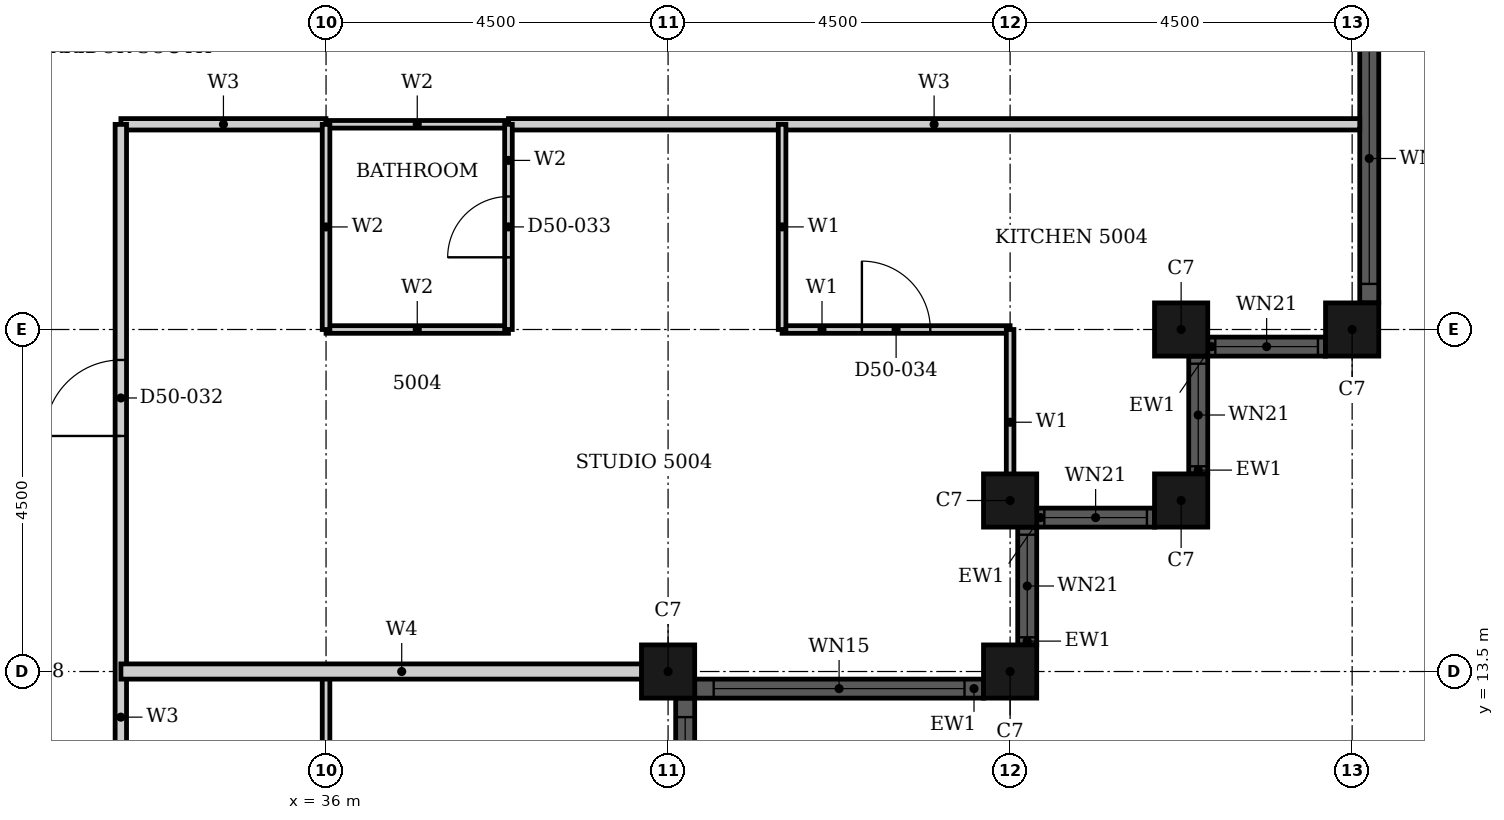
"""IFC4 building model, lengths in metres.
Left out: names, types, materials, properties, quantities, classifications, styles, units other than length and angle.
Written with IfcOpenShell. Run it as: python <this file> out.ifc"""

import sys

from ifc_helpers import new_model, si_unit, direction, frame, frame_2d, origin, origin_2d, place, context, subcontext, project, spatial, rectangle, hollow_rectangle, extrude, element, fill, save


model = new_model("IFC4")
c1 = context("Model", 3, precision=1e-05, world=origin(), true_north=direction((0.0, 1.0)))
c2 = subcontext(c1, "Body", "Model", "MODEL_VIEW")
j1 = project(units=[si_unit("LENGTHUNIT", "METRE"), si_unit("PLANEANGLEUNIT", "RADIAN")], contexts=[c1])
p1 = place(None, origin())
s1 = spatial("IfcSite", under=j1, at=p1, CompositionType="ELEMENT")
p2 = place(p1, origin())
s2 = spatial("IfcBuilding", under=s1, at=p2, CompositionType="ELEMENT")
p3 = place(p2, frame((0.0, 0.0, 199.8)))
s3 = spatial("IfcBuildingStorey", under=s2, at=p3, CompositionType="ELEMENT", Elevation=199.8)
for number, where, z_axis, x_axis in (
    (1, (40.5, 13.5, 0.0), (0.0, 0.0, 1.0), (1.0, 0.0, 0.0)),
    (2, (45.0, 13.5, 0.0), (0.0, 0.0, 1.0), (1.0, 0.0, 0.0)),
    (3, (45.0, 15.75, 0.0), (0.0, 0.0, 1.0), (1.0, 0.0, 0.0)),
    (4, (47.25, 15.75, 0.0), (0.0, 0.0, 1.0), (1.0, 0.0, 0.0)),
    (5, (47.25, 18.0, 0.0), (0.0, 0.0, 1.0), (1.0, 0.0, 0.0)),
    (6, (49.5, 18.0, 0.0), (0.0, 0.0, 1.0), (1.0, 0.0, 0.0)),
):
    element("IfcColumn", number, at=place(p3, frame(where, z_axis=z_axis, x_axis=x_axis)), inside=s3, PredefinedType="COLUMN", context=c2, shape_type="SweptSolid", body=[
        extrude(hollow_rectangle(XDim=0.7, YDim=0.7, WallThickness=0.022, at=origin_2d()), origin(), (0.0, 0.0, 1.0), 3.7),
    ])
p4 = place(p3, frame((40.85, 13.275, 0.0), z_axis=(0.0, 0.0, 1.0), x_axis=(1.0, 0.0, 0.0)))
e7 = element("IfcWall", 7, at=p4, inside=s3, PredefinedType="SOLIDWALL", context=c2, shape_type="SweptSolid", body=[
    extrude(rectangle(XDim=3.8, YDim=0.25, at=frame_2d((1.9, 0.0))), origin(), (0.0, 0.0, 1.0), 3.7),
])
p5 = place(p4, frame((0.25, 0.0, 0.45)))
e8 = element("IfcOpeningElement", 8, at=p5, cuts=e7, PredefinedType="OPENING", context=c2, shape_type="SweptSolid", body=[
    extrude(rectangle(XDim=3.3, YDim=2.3, at=frame_2d((1.65, 1.15))), frame((0.0, 0.135, 0.0), z_axis=(0.0, -1.0, 0.0), x_axis=(1.0, 0.0, 0.0)), (0.0, 0.0, 1.0), 0.27),
])
p6 = place(p3, frame((45.225, 13.85, 0.0), z_axis=(0.0, 0.0, 1.0), x_axis=(0.0, 1.0, 0.0)))
e9 = element("IfcWall", 9, at=p6, inside=s3, PredefinedType="SOLIDWALL", context=c2, shape_type="SweptSolid", body=[
    extrude(rectangle(XDim=1.55, YDim=0.25, at=frame_2d((0.775, 0.0))), origin(), (0.0, 0.0, 1.0), 3.7),
])
p7 = place(p6, frame((0.1, 0.0, 0.9)))
e10 = element("IfcOpeningElement", 10, at=p7, cuts=e9, PredefinedType="OPENING", context=c2, shape_type="SweptSolid", body=[
    extrude(rectangle(XDim=1.35, YDim=1.85, at=frame_2d((0.675, 0.925))), frame((0.0, 0.135, 0.0), z_axis=(0.0, -1.0, 0.0), x_axis=(1.0, 0.0, 0.0)), (0.0, 0.0, 1.0), 0.27),
])
p8 = place(p3, frame((45.35, 15.525, 0.0), z_axis=(0.0, 0.0, 1.0), x_axis=(1.0, 0.0, 0.0)))
e11 = element("IfcWall", 11, at=p8, inside=s3, PredefinedType="SOLIDWALL", context=c2, shape_type="SweptSolid", body=[
    extrude(rectangle(XDim=1.55, YDim=0.25, at=frame_2d((0.775, 0.0))), origin(), (0.0, 0.0, 1.0), 3.7),
])
p9 = place(p8, frame((0.1, 0.0, 0.9)))
e12 = element("IfcOpeningElement", 12, at=p9, cuts=e11, PredefinedType="OPENING", context=c2, shape_type="SweptSolid", body=[
    extrude(rectangle(XDim=1.35, YDim=1.85, at=frame_2d((0.675, 0.925))), frame((0.0, 0.135, 0.0), z_axis=(0.0, -1.0, 0.0), x_axis=(1.0, 0.0, 0.0)), (0.0, 0.0, 1.0), 0.27),
])
p10 = place(p3, frame((47.475, 16.1, 0.0), z_axis=(0.0, 0.0, 1.0), x_axis=(0.0, 1.0, 0.0)))
e13 = element("IfcWall", 13, at=p10, inside=s3, PredefinedType="SOLIDWALL", context=c2, shape_type="SweptSolid", body=[
    extrude(rectangle(XDim=1.55, YDim=0.25, at=frame_2d((0.775, 0.0))), origin(), (0.0, 0.0, 1.0), 3.7),
])
p11 = place(p10, frame((0.1, 0.0, 0.9)))
e14 = element("IfcOpeningElement", 14, at=p11, cuts=e13, PredefinedType="OPENING", context=c2, shape_type="SweptSolid", body=[
    extrude(rectangle(XDim=1.35, YDim=1.85, at=frame_2d((0.675, 0.925))), frame((0.0, 0.135, 0.0), z_axis=(0.0, -1.0, 0.0), x_axis=(1.0, 0.0, 0.0)), (0.0, 0.0, 1.0), 0.27),
])
p12 = place(p3, frame((47.6, 17.775, 0.0), z_axis=(0.0, 0.0, 1.0), x_axis=(1.0, 0.0, 0.0)))
e15 = element("IfcWall", 15, at=p12, inside=s3, PredefinedType="SOLIDWALL", context=c2, shape_type="SweptSolid", body=[
    extrude(rectangle(XDim=1.55, YDim=0.25, at=frame_2d((0.775, 0.0))), origin(), (0.0, 0.0, 1.0), 3.7),
])
p13 = place(p12, frame((0.1, 0.0, 0.9)))
e16 = element("IfcOpeningElement", 16, at=p13, cuts=e15, PredefinedType="OPENING", context=c2, shape_type="SweptSolid", body=[
    extrude(rectangle(XDim=1.35, YDim=1.85, at=frame_2d((0.675, 0.925))), frame((0.0, 0.135, 0.0), z_axis=(0.0, -1.0, 0.0), x_axis=(1.0, 0.0, 0.0)), (0.0, 0.0, 1.0), 0.27),
])
p14 = place(p3, frame((49.725, 18.35, 0.0), z_axis=(0.0, 0.0, 1.0), x_axis=(0.0, 1.0, 0.0)))
e17 = element("IfcWall", 17, at=p14, inside=s3, PredefinedType="SOLIDWALL", context=c2, shape_type="SweptSolid", body=[
    extrude(rectangle(XDim=8.3, YDim=0.25, at=frame_2d((4.15, 0.0))), origin(), (0.0, 0.0, 1.0), 3.7),
])
p15 = place(p14, frame((0.25, 0.0, 0.45)))
e18 = element("IfcOpeningElement", 18, at=p15, cuts=e17, PredefinedType="OPENING", context=c2, shape_type="SweptSolid", body=[
    extrude(rectangle(XDim=3.3, YDim=2.3, at=frame_2d((1.65, 1.15))), frame((0.0, 0.135, 0.0), z_axis=(0.0, -1.0, 0.0), x_axis=(1.0, 0.0, 0.0)), (0.0, 0.0, 1.0), 0.27),
])
p16 = place(p14, frame((4.75, 0.0, 0.45)))
e19 = element("IfcOpeningElement", 19, at=p16, cuts=e17, PredefinedType="OPENING", context=c2, shape_type="SweptSolid", body=[
    extrude(rectangle(XDim=3.3, YDim=2.3, at=frame_2d((1.65, 1.15))), frame((0.0, 0.135, 0.0), z_axis=(0.0, -1.0, 0.0), x_axis=(1.0, 0.0, 0.0)), (0.0, 0.0, 1.0), 0.27),
])
p17 = place(p3, frame((40.725, 4.85, 0.0), z_axis=(0.0, 0.0, 1.0), x_axis=(0.0, 1.0, 0.0)))
e20 = element("IfcWall", 20, at=p17, inside=s3, PredefinedType="SOLIDWALL", context=c2, shape_type="SweptSolid", body=[
    extrude(rectangle(XDim=8.3, YDim=0.25, at=frame_2d((4.15, 0.0))), origin(), (0.0, 0.0, 1.0), 3.7),
])
p18 = place(p17, frame((0.25, 0.0, 0.45)))
e21 = element("IfcOpeningElement", 21, at=p18, cuts=e20, PredefinedType="OPENING", context=c2, shape_type="SweptSolid", body=[
    extrude(rectangle(XDim=3.3, YDim=2.3, at=frame_2d((1.65, 1.15))), frame((0.0, 0.135, 0.0), z_axis=(0.0, -1.0, 0.0), x_axis=(1.0, 0.0, 0.0)), (0.0, 0.0, 1.0), 0.27),
])
p19 = place(p17, frame((4.75, 0.0, 0.45)))
e22 = element("IfcOpeningElement", 22, at=p19, cuts=e20, PredefinedType="OPENING", context=c2, shape_type="SweptSolid", body=[
    extrude(rectangle(XDim=3.3, YDim=2.3, at=frame_2d((1.65, 1.15))), frame((0.0, 0.135, 0.0), z_axis=(0.0, -1.0, 0.0), x_axis=(1.0, 0.0, 0.0)), (0.0, 0.0, 1.0), 0.27),
])
p20 = place(p3, frame((33.301, 20.7, 0.0), z_axis=(0.0, 0.0, 1.0), x_axis=(1.0, 0.0, 0.0)))
e23 = element("IfcWall", 23, at=p20, inside=s3, PredefinedType="PARTITIONING", context=c2, shape_type="SweptSolid", body=[
    extrude(rectangle(XDim=2.698, YDim=0.15, at=frame_2d((1.349, 0.0))), origin(), (0.0, 0.0, 1.0), 3.4),
])
p21 = place(p3, frame((38.4, 20.7, 0.0), z_axis=(0.0, 0.0, 1.0), x_axis=(1.0, 0.0, 0.0)))
e24 = element("IfcWall", 24, at=p21, inside=s3, PredefinedType="PARTITIONING", context=c2, shape_type="SweptSolid", body=[
    extrude(rectangle(XDim=11.2, YDim=0.15, at=frame_2d((5.6, 0.0))), origin(), (0.0, 0.0, 1.0), 3.4),
])
p22 = place(p3, frame((33.3, 6.9, 0.0), z_axis=(0.0, 0.0, 1.0), x_axis=(0.0, 1.0, 0.0)))
e25 = element("IfcWall", 25, at=p22, inside=s3, PredefinedType="PARTITIONING", context=c2, shape_type="SweptSolid", body=[
    extrude(rectangle(XDim=13.799, YDim=0.15, at=frame_2d((6.899, 0.0))), origin(), (0.0, 0.0, 1.0), 3.4),
])
p23 = place(p22, frame((9.699, 0.0, 0.0)))
e26 = element("IfcOpeningElement", 26, at=p23, cuts=e25, PredefinedType="OPENING", context=c2, shape_type="SweptSolid", body=[
    extrude(rectangle(XDim=1.0, YDim=2.2, at=frame_2d((0.5, 1.1))), frame((0.0, 0.085, 0.0), z_axis=(0.0, -1.0, 0.0), x_axis=(1.0, 0.0, 0.0)), (0.0, 0.0, 1.0), 0.17),
])
p24 = place(p22, frame((1.3, 0.0, 0.0)))
e27 = element("IfcOpeningElement", 27, at=p24, cuts=e25, PredefinedType="OPENING", context=c2, shape_type="SweptSolid", body=[
    extrude(rectangle(XDim=1.0, YDim=2.2, at=frame_2d((0.5, 1.1))), frame((0.0, 0.085, 0.0), z_axis=(0.0, -1.0, 0.0), x_axis=(1.0, 0.0, 0.0)), (0.0, 0.0, 1.0), 0.17),
])
p25 = place(p3, frame((42.0, 18.0, 0.0), z_axis=(0.0, 0.0, 1.0), x_axis=(1.0, 0.0, 0.0)))
e28 = element("IfcWall", 28, at=p25, inside=s3, PredefinedType="PARTITIONING", context=c2, shape_type="SweptSolid", body=[
    extrude(rectangle(XDim=3.0, YDim=0.1, at=frame_2d((1.5, 0.0))), origin(), (0.0, 0.0, 1.0), 3.4),
])
p26 = place(p25, frame((1.05, 0.0, 0.0)))
e29 = element("IfcOpeningElement", 29, at=p26, cuts=e28, PredefinedType="OPENING", context=c2, shape_type="SweptSolid", body=[
    extrude(rectangle(XDim=0.9, YDim=2.1, at=frame_2d((0.45, 1.05))), frame((0.0, 0.06, 0.0), z_axis=(0.0, -1.0, 0.0), x_axis=(1.0, 0.0, 0.0)), (0.0, 0.0, 1.0), 0.12),
])
p27 = place(p3, frame((36.0, 10.5, 0.0), z_axis=(0.0, 0.0, 1.0), x_axis=(0.0, 1.0, 0.0)))
e30 = element("IfcWall", 30, at=p27, inside=s3, PredefinedType="PARTITIONING", context=c2, shape_type="SweptSolid", body=[
    extrude(rectangle(XDim=3.0, YDim=0.1, at=frame_2d((1.5, 0.0))), origin(), (0.0, 0.0, 1.0), 2.68),
])
p28 = place(p27, frame((1.05, 0.0, 0.0)))
e31 = element("IfcOpeningElement", 31, at=p28, cuts=e30, PredefinedType="OPENING", context=c2, shape_type="SweptSolid", body=[
    extrude(rectangle(XDim=0.9, YDim=2.1, at=frame_2d((0.45, 1.05))), frame((0.0, 0.06, 0.0), z_axis=(0.0, -1.0, 0.0), x_axis=(1.0, 0.0, 0.0)), (0.0, 0.0, 1.0), 0.12),
])
p29 = place(p3, frame((42.0, 18.0, 0.0), z_axis=(0.0, 0.0, 1.0), x_axis=(0.0, 1.0, 0.0)))
e32 = element("IfcWall", 32, at=p29, inside=s3, PredefinedType="PARTITIONING", context=c2, shape_type="SweptSolid", body=[
    extrude(rectangle(XDim=2.7, YDim=0.1, at=frame_2d((1.35, 0.0))), origin(), (0.0, 0.0, 1.0), 3.4),
])
p30 = place(p3, frame((45.0, 15.56, 0.0), z_axis=(0.0, 0.0, 1.0), x_axis=(0.0, 1.0, 0.0)))
e33 = element("IfcWall", 33, at=p30, inside=s3, PredefinedType="PARTITIONING", context=c2, shape_type="SweptSolid", body=[
    extrude(rectangle(XDim=2.44, YDim=0.1, at=frame_2d((1.22, 0.0))), origin(), (0.0, 0.0, 1.0), 3.4),
])
p31 = place(p3, frame((33.301, 13.5, 0.0), z_axis=(0.0, 0.0, 1.0), x_axis=(1.0, 0.0, 0.0)))
e34 = element("IfcWall", 34, at=p31, inside=s3, PredefinedType="PARTITIONING", context=c2, shape_type="SweptSolid", body=[
    extrude(rectangle(XDim=7.389, YDim=0.2, at=frame_2d((3.694, 0.0))), origin(), (0.0, 0.0, 1.0), 2.48),
])
for number, where, z_axis, x_axis in (
    (35, (36.0, 18.0, 0.0), (0.0, 0.0, 1.0), (1.0, 0.0, 0.0)),
    (36, (36.0, 20.7, 0.0), (0.0, 0.0, 1.0), (1.0, 0.0, 0.0)),
):
    element("IfcWall", number, at=place(p3, frame(where, z_axis=z_axis, x_axis=x_axis)), inside=s3, PredefinedType="PARTITIONING", context=c2, shape_type="SweptSolid", body=[
        extrude(rectangle(XDim=2.4, YDim=0.1, at=frame_2d((1.2, 0.0))), origin(), (0.0, 0.0, 1.0), 3.4),
    ])
p32 = place(p3, frame((36.0, 18.0, 0.0), z_axis=(0.0, 0.0, 1.0), x_axis=(0.0, 1.0, 0.0)))
e37 = element("IfcWall", 37, at=p32, inside=s3, PredefinedType="PARTITIONING", context=c2, shape_type="SweptSolid", body=[
    extrude(rectangle(XDim=2.699, YDim=0.1, at=frame_2d((1.35, 0.0))), origin(), (0.0, 0.0, 1.0), 3.4),
])
p33 = place(p3, frame((38.4, 18.0, 0.0), z_axis=(0.0, 0.0, 1.0), x_axis=(0.0, 1.0, 0.0)))
e38 = element("IfcWall", 38, at=p33, inside=s3, PredefinedType="PARTITIONING", context=c2, shape_type="SweptSolid", body=[
    extrude(rectangle(XDim=2.7, YDim=0.1, at=frame_2d((1.35, 0.0))), origin(), (0.0, 0.0, 1.0), 3.4),
])
p34 = place(p33, frame((0.95, 0.0, 0.0)))
e39 = element("IfcOpeningElement", 39, at=p34, cuts=e38, PredefinedType="OPENING", context=c2, shape_type="SweptSolid", body=[
    extrude(rectangle(XDim=0.8, YDim=2.1, at=frame_2d((0.4, 1.05))), frame((0.0, 0.06, 0.0), z_axis=(0.0, -1.0, 0.0), x_axis=(1.0, 0.0, 0.0)), (0.0, 0.0, 1.0), 0.12),
])
p35 = place(p5, origin())
e40 = element("IfcWindow", 40, at=p35, inside=s3, PartitioningType="SINGLE_PANEL", PredefinedType="WINDOW", context=c2, shape_type="SweptSolid", body=[
    extrude(rectangle(XDim=3.3, YDim=2.3, at=frame_2d((1.65, 1.15))), frame((0.0, 0.03, 0.0), z_axis=(0.0, -1.0, 0.0), x_axis=(1.0, 0.0, 0.0)), (0.0, 0.0, 1.0), 0.06),
])
fill(e8, e40)
p36 = place(p7, origin())
e41 = element("IfcWindow", 41, at=p36, inside=s3, PartitioningType="SINGLE_PANEL", PredefinedType="WINDOW", context=c2, shape_type="SweptSolid", body=[
    extrude(rectangle(XDim=1.35, YDim=1.85, at=frame_2d((0.675, 0.925))), frame((0.0, 0.03, 0.0), z_axis=(0.0, -1.0, 0.0), x_axis=(1.0, 0.0, 0.0)), (0.0, 0.0, 1.0), 0.06),
])
fill(e10, e41)
p37 = place(p9, origin())
e42 = element("IfcWindow", 42, at=p37, inside=s3, PartitioningType="SINGLE_PANEL", PredefinedType="WINDOW", context=c2, shape_type="SweptSolid", body=[
    extrude(rectangle(XDim=1.35, YDim=1.85, at=frame_2d((0.675, 0.925))), frame((0.0, 0.03, 0.0), z_axis=(0.0, -1.0, 0.0), x_axis=(1.0, 0.0, 0.0)), (0.0, 0.0, 1.0), 0.06),
])
fill(e12, e42)
p38 = place(p11, origin())
e43 = element("IfcWindow", 43, at=p38, inside=s3, PartitioningType="SINGLE_PANEL", PredefinedType="WINDOW", context=c2, shape_type="SweptSolid", body=[
    extrude(rectangle(XDim=1.35, YDim=1.85, at=frame_2d((0.675, 0.925))), frame((0.0, 0.03, 0.0), z_axis=(0.0, -1.0, 0.0), x_axis=(1.0, 0.0, 0.0)), (0.0, 0.0, 1.0), 0.06),
])
fill(e14, e43)
p39 = place(p13, origin())
e44 = element("IfcWindow", 44, at=p39, inside=s3, PartitioningType="SINGLE_PANEL", PredefinedType="WINDOW", context=c2, shape_type="SweptSolid", body=[
    extrude(rectangle(XDim=1.35, YDim=1.85, at=frame_2d((0.675, 0.925))), frame((0.0, 0.03, 0.0), z_axis=(0.0, -1.0, 0.0), x_axis=(1.0, 0.0, 0.0)), (0.0, 0.0, 1.0), 0.06),
])
fill(e16, e44)
p40 = place(p15, origin())
e45 = element("IfcWindow", 45, at=p40, inside=s3, PartitioningType="SINGLE_PANEL", PredefinedType="WINDOW", context=c2, shape_type="SweptSolid", body=[
    extrude(rectangle(XDim=3.3, YDim=2.3, at=frame_2d((1.65, 1.15))), frame((0.0, 0.03, 0.0), z_axis=(0.0, -1.0, 0.0), x_axis=(1.0, 0.0, 0.0)), (0.0, 0.0, 1.0), 0.06),
])
fill(e18, e45)
p41 = place(p19, origin())
e46 = element("IfcWindow", 46, at=p41, inside=s3, PartitioningType="SINGLE_PANEL", PredefinedType="WINDOW", context=c2, shape_type="SweptSolid", body=[
    extrude(rectangle(XDim=3.3, YDim=2.3, at=frame_2d((1.65, 1.15))), frame((0.0, 0.03, 0.0), z_axis=(0.0, -1.0, 0.0), x_axis=(1.0, 0.0, 0.0)), (0.0, 0.0, 1.0), 0.06),
])
fill(e22, e46)
p42 = place(p23, origin())
e47 = element("IfcDoor", 47, at=p42, inside=s3, OperationType="SINGLE_SWING_RIGHT", PredefinedType="DOOR", context=c2, shape_type="SweptSolid", body=[
    extrude(rectangle(XDim=1.0, YDim=2.2, at=frame_2d((0.5, 1.1))), frame((0.0, 0.025, 0.0), z_axis=(0.0, -1.0, 0.0), x_axis=(1.0, 0.0, 0.0)), (0.0, 0.0, 1.0), 0.05),
])
fill(e26, e47)
p43 = place(p34, origin())
e48 = element("IfcDoor", 48, at=p43, inside=s3, OperationType="SINGLE_SWING_RIGHT", PredefinedType="DOOR", context=c2, shape_type="SweptSolid", body=[
    extrude(rectangle(XDim=0.8, YDim=2.1, at=frame_2d((0.4, 1.05))), frame((0.0, 0.025, 0.0), z_axis=(0.0, -1.0, 0.0), x_axis=(1.0, 0.0, 0.0)), (0.0, 0.0, 1.0), 0.05),
])
fill(e39, e48)
p44 = place(p26, origin())
e49 = element("IfcDoor", 49, at=p44, inside=s3, OperationType="SINGLE_SWING_LEFT", PredefinedType="DOOR", context=c2, shape_type="SweptSolid", body=[
    extrude(rectangle(XDim=0.9, YDim=2.1, at=frame_2d((0.45, 1.05))), frame((0.0, 0.025, 0.0), z_axis=(0.0, -1.0, 0.0), x_axis=(1.0, 0.0, 0.0)), (0.0, 0.0, 1.0), 0.05),
])
fill(e29, e49)
save(model, sys.argv[1])
